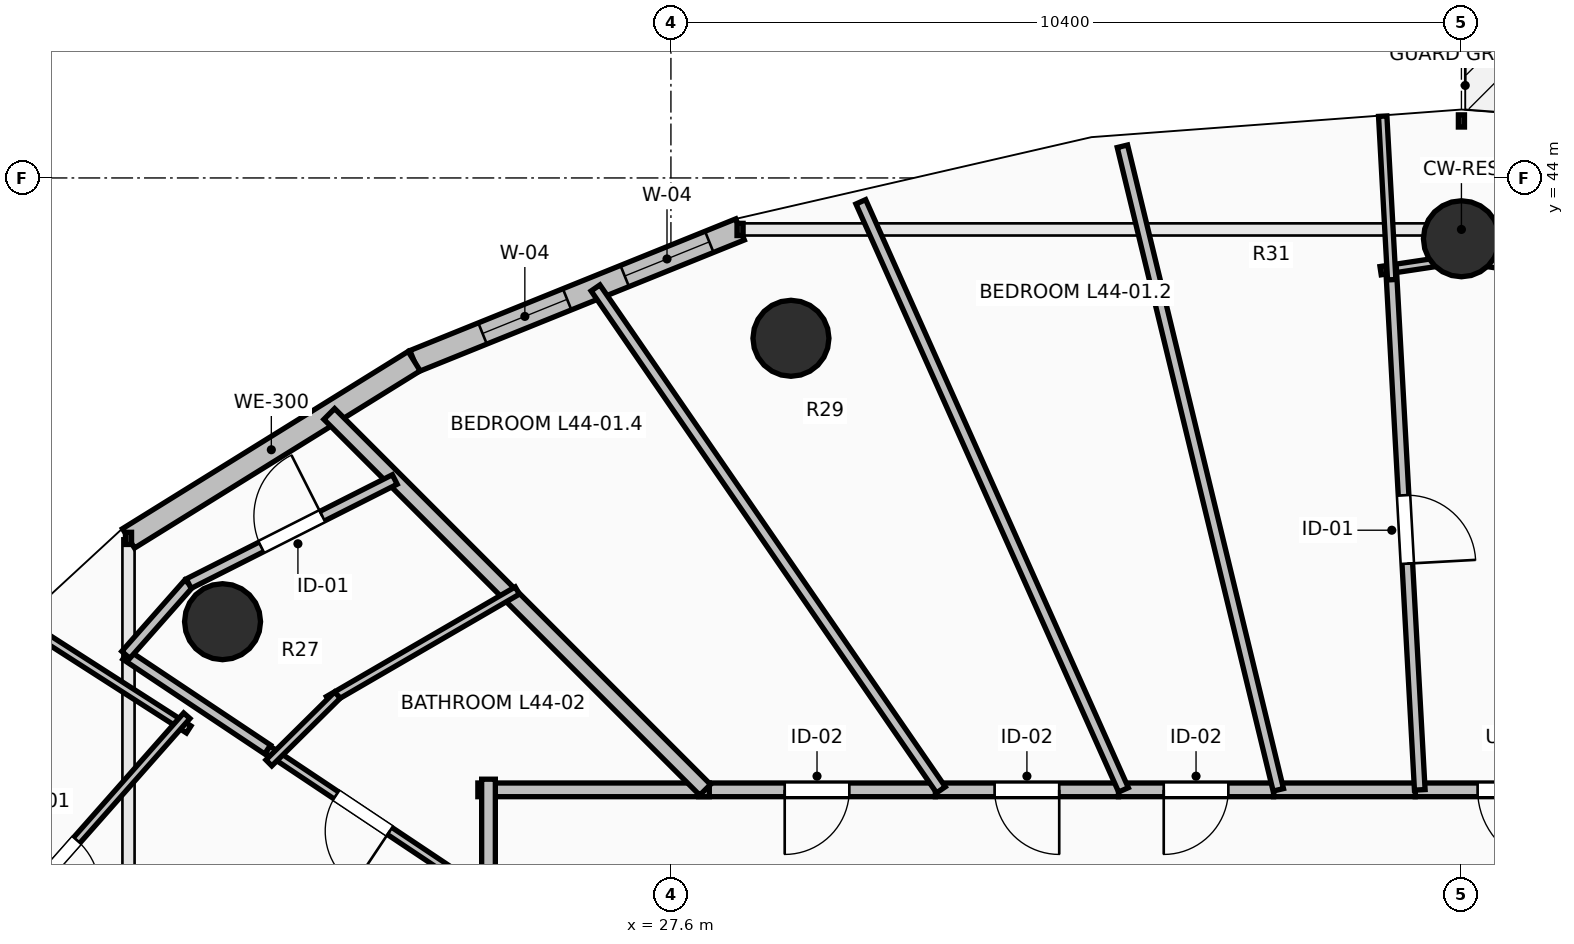
"""IFC4 building model, lengths in metres.
Left out: names, types, materials, properties, quantities, classifications, styles, units other than length and angle.
Written with IfcOpenShell. Run it as: python <this file> out.ifc"""

import sys

from ifc_helpers import new_model, si_unit, direction, frame, frame_2d, origin, origin_2d, place, context, subcontext, project, spatial, rectangle, circle, extrude, element, fill, save


model = new_model("IFC4")
c1 = context("Model", 3, precision=1e-05, world=origin(), true_north=direction((0.0, 1.0)))
c2 = subcontext(c1, "Body", "Model", "MODEL_VIEW")
j1 = project(units=[si_unit("LENGTHUNIT", "METRE"), si_unit("PLANEANGLEUNIT", "RADIAN")], contexts=[c1])
p1 = place(None, origin())
s1 = spatial("IfcSite", under=j1, at=p1, CompositionType="ELEMENT")
p2 = place(p1, origin())
s2 = spatial("IfcBuilding", under=s1, at=p2, CompositionType="ELEMENT")
p3 = place(p2, frame((0.0, 0.0, 164.1)))
s3 = spatial("IfcBuildingStorey", under=s2, at=p3, CompositionType="ELEMENT", Elevation=164.1)
for number, where, z_axis, x_axis in (
    (1, (38.0, 43.2, 0.0), (0.0, 0.0, 1.0), (0.0, 1.0, 0.0)),
    (2, (29.179, 41.891, 0.0), (0.0, 0.0, 1.0), (-0.383, 0.924, 0.0)),
    (3, (21.701, 38.162, 0.0), (0.0, 0.0, 1.0), (-0.707, 0.707, 0.0)),
):
    element("IfcColumn", number, at=place(p3, frame(where, z_axis=z_axis, x_axis=x_axis)), inside=s3, PredefinedType="COLUMN", context=c2, shape_type="SweptSolid", body=[
        extrude(circle(Radius=0.5, at=origin_2d()), origin(), (0.0, 0.0, 1.0), 3.5),
    ])
p4 = place(p3, frame((28.51, 43.323, 0.0), z_axis=(0.0, 0.0, 1.0), x_axis=(-0.927156504392, -0.374674280359, 0.0)))
e4 = element("IfcWall", 4, at=p4, inside=s3, PredefinedType="STANDARD", context=c2, shape_type="SweptSolid", body=[
    extrude(rectangle(XDim=4.625, YDim=0.3, at=frame_2d((2.312, 0.0))), origin(), (0.0, 0.0, 1.0), 3.24),
])
p5 = place(p4, frame((0.437, 0.0, 0.85)))
e5 = element("IfcOpeningElement", 5, at=p5, cuts=e4, PredefinedType="OPENING", context=c2, shape_type="SweptSolid", body=[
    extrude(rectangle(XDim=1.2, YDim=1.95, at=frame_2d((0.6, 0.975))), frame((0.0, 0.165, 0.0), z_axis=(0.0, -1.0, 0.0), x_axis=(1.0, 0.0, 0.0)), (0.0, 0.0, 1.0), 0.33),
])
p6 = place(p4, frame((2.454, 0.0, 0.85)))
e6 = element("IfcOpeningElement", 6, at=p6, cuts=e4, PredefinedType="OPENING", context=c2, shape_type="SweptSolid", body=[
    extrude(rectangle(XDim=1.2, YDim=1.95, at=frame_2d((0.6, 0.975))), frame((0.0, 0.165, 0.0), z_axis=(0.0, -1.0, 0.0), x_axis=(1.0, 0.0, 0.0)), (0.0, 0.0, 1.0), 0.33),
])
p7 = place(p3, frame((24.222, 41.59, 0.0), z_axis=(0.0, 0.0, 1.0), x_axis=(-0.849721181976, -0.527232313977, 0.0)))
e7 = element("IfcWall", 7, at=p7, inside=s3, PredefinedType="STANDARD", context=c2, shape_type="SweptSolid", body=[
    extrude(rectangle(XDim=4.423, YDim=0.3, at=frame_2d((2.211, 0.0))), origin(), (0.0, 0.0, 1.0), 3.24),
])
p8 = place(p3, frame((40.034, 35.95, 0.0), z_axis=(0.0, 0.0, 1.0), x_axis=(-1.0, 0.0, 0.0)))
e8 = element("IfcWall", 8, at=p8, inside=s3, PredefinedType="PARTITIONING", context=c2, shape_type="SweptSolid", body=[
    extrude(rectangle(XDim=2.642, YDim=0.18, at=frame_2d((1.321, 0.0))), origin(), (0.0, 0.0, 1.0), 3.24),
])
p9 = place(p8, frame((0.821, 0.0, 0.0)))
e9 = element("IfcOpeningElement", 9, at=p9, cuts=e8, PredefinedType="OPENING", context=c2, shape_type="SweptSolid", body=[
    extrude(rectangle(XDim=1.0, YDim=2.15, at=frame_2d((0.5, 1.075))), frame((0.0, 0.105, 0.0), z_axis=(0.0, -1.0, 0.0), x_axis=(1.0, 0.0, 0.0)), (0.0, 0.0, 1.0), 0.21),
])
p10 = place(p3, frame((37.392, 35.95, 0.0), z_axis=(0.0, 0.0, 1.0), x_axis=(-1.0, 0.0, 0.0)))
e10 = element("IfcWall", 10, at=p10, inside=s3, PredefinedType="PARTITIONING", context=c2, shape_type="SweptSolid", body=[
    extrude(rectangle(XDim=1.863, YDim=0.18, at=frame_2d((0.932, 0.0))), origin(), (0.0, 0.0, 1.0), 3.24),
])
p11 = place(p3, frame((35.529, 35.95, 0.0), z_axis=(0.0, 0.0, 1.0), x_axis=(-1.0, 0.0, 0.0)))
e11 = element("IfcWall", 11, at=p11, inside=s3, PredefinedType="PARTITIONING", context=c2, shape_type="SweptSolid", body=[
    extrude(rectangle(XDim=2.041, YDim=0.18, at=frame_2d((1.021, 0.0))), origin(), (0.0, 0.0, 1.0), 3.24),
])
p12 = place(p11, frame((0.595, 0.0, 0.0)))
e12 = element("IfcOpeningElement", 12, at=p12, cuts=e11, PredefinedType="OPENING", context=c2, shape_type="SweptSolid", body=[
    extrude(rectangle(XDim=0.85, YDim=2.1, at=frame_2d((0.425, 1.05))), frame((0.0, 0.105, 0.0), z_axis=(0.0, -1.0, 0.0), x_axis=(1.0, 0.0, 0.0)), (0.0, 0.0, 1.0), 0.21),
])
p13 = place(p3, frame((33.488, 35.95, 0.0), z_axis=(0.0, 0.0, 1.0), x_axis=(-1.0, 0.0, 0.0)))
e13 = element("IfcWall", 13, at=p13, inside=s3, PredefinedType="PARTITIONING", context=c2, shape_type="SweptSolid", body=[
    extrude(rectangle(XDim=2.409, YDim=0.18, at=frame_2d((1.205, 0.0))), origin(), (0.0, 0.0, 1.0), 3.24),
])
p14 = place(p13, frame((0.78, 0.0, 0.0)))
e14 = element("IfcOpeningElement", 14, at=p14, cuts=e13, PredefinedType="OPENING", context=c2, shape_type="SweptSolid", body=[
    extrude(rectangle(XDim=0.85, YDim=2.1, at=frame_2d((0.425, 1.05))), frame((0.0, 0.105, 0.0), z_axis=(0.0, -1.0, 0.0), x_axis=(1.0, 0.0, 0.0)), (0.0, 0.0, 1.0), 0.21),
])
p15 = place(p3, frame((31.079, 35.95, 0.0), z_axis=(0.0, 0.0, 1.0), x_axis=(-1.0, 0.0, 0.0)))
e15 = element("IfcWall", 15, at=p15, inside=s3, PredefinedType="PARTITIONING", context=c2, shape_type="SweptSolid", body=[
    extrude(rectangle(XDim=3.114, YDim=0.18, at=frame_2d((1.557, 0.0))), origin(), (0.0, 0.0, 1.0), 2.432),
])
p16 = place(p15, frame((1.132, 0.0, 0.0)))
e16 = element("IfcOpeningElement", 16, at=p16, cuts=e15, PredefinedType="OPENING", context=c2, shape_type="SweptSolid", body=[
    extrude(rectangle(XDim=0.85, YDim=2.1, at=frame_2d((0.425, 1.05))), frame((0.0, 0.105, 0.0), z_axis=(0.0, -1.0, 0.0), x_axis=(1.0, 0.0, 0.0)), (0.0, 0.0, 1.0), 0.21),
])
p17 = place(p3, frame((28.105, 35.95, 0.0), z_axis=(0.0, 0.0, 1.0), x_axis=(-1.0, 0.0, 0.0)))
e17 = element("IfcWall", 17, at=p17, inside=s3, PredefinedType="PARTITIONING", context=c2, shape_type="SweptSolid", body=[
    extrude(rectangle(XDim=3.045, YDim=0.18, at=frame_2d((1.522, 0.0))), origin(), (0.0, 0.0, 1.0), 2.432),
])
p18 = place(p3, frame((25.2, 36.09, 0.0), z_axis=(0.0, 0.0, 1.0), x_axis=(0.0, -1.0, 0.0)))
e18 = element("IfcWall", 18, at=p18, inside=s3, PredefinedType="PARTITIONING", context=c2, shape_type="SweptSolid", body=[
    extrude(rectangle(XDim=1.617, YDim=0.18, at=frame_2d((0.809, 0.0))), origin(), (0.0, 0.0, 1.0), 2.432),
])
p19 = place(p3, frame((41.102, 42.473, 0.0), z_axis=(0.0, 0.0, 1.0), x_axis=(-0.98887178047, 0.148770298749, 0.0)))
e19 = element("IfcWall", 19, at=p19, inside=s3, PredefinedType="PARTITIONING", context=c2, shape_type="SweptSolid", body=[
    extrude(rectangle(XDim=3.277, YDim=0.11, at=frame_2d((1.639, 0.0))), origin(), (0.0, 0.0, 1.0), 2.432),
])
p20 = place(p19, frame((1.189, 0.0, 0.0)))
e20 = element("IfcOpeningElement", 20, at=p20, cuts=e19, PredefinedType="OPENING", context=c2, shape_type="SweptSolid", body=[
    extrude(rectangle(XDim=0.9, YDim=2.1, at=frame_2d((0.45, 1.05))), frame((0.0, 0.07, 0.0), z_axis=(0.0, -1.0, 0.0), x_axis=(1.0, 0.0, 0.0)), (0.0, 0.0, 1.0), 0.14),
])
p21 = place(p3, frame((38.138, 42.961, 0.0), z_axis=(0.0, 0.0, 1.0), x_axis=(-0.988920139242, -0.148448503534, 0.0)))
e21 = element("IfcWall", 21, at=p21, inside=s3, PredefinedType="PARTITIONING", context=c2, shape_type="SweptSolid", body=[
    extrude(rectangle(XDim=1.215, YDim=0.11, at=frame_2d((0.608, 0.0))), origin(), (0.0, 0.0, 1.0), 2.432),
])
p22 = place(p3, frame((37.075, 42.801, 0.0), z_axis=(0.0, 0.0, 1.0), x_axis=(0.054937930554, -0.998489771498, 0.0)))
e22 = element("IfcWall", 22, at=p22, inside=s3, PredefinedType="PARTITIONING", context=c2, shape_type="SweptSolid", body=[
    extrude(rectangle(XDim=6.861, YDim=0.14, at=frame_2d((3.431, 0.0))), origin(), (0.0, 0.0, 1.0), 2.432),
])
p23 = place(p22, frame((2.981, 0.0, 0.0)))
e23 = element("IfcOpeningElement", 23, at=p23, cuts=e22, PredefinedType="OPENING", context=c2, shape_type="SweptSolid", body=[
    extrude(rectangle(XDim=0.9, YDim=2.1, at=frame_2d((0.45, 1.05))), frame((0.0, 0.085, 0.0), z_axis=(0.0, -1.0, 0.0), x_axis=(1.0, 0.0, 0.0)), (0.0, 0.0, 1.0), 0.17),
])
p24 = place(p3, frame((36.964, 44.813, 0.0), z_axis=(0.0, 0.0, 1.0), x_axis=(0.054949193079, -0.998489151759, 0.0)))
e24 = element("IfcWall", 24, at=p24, inside=s3, PredefinedType="PARTITIONING", context=c2, shape_type="SweptSolid", body=[
    extrude(rectangle(XDim=2.155, YDim=0.11, at=frame_2d((1.077, 0.0))), origin(), (0.0, 0.0, 1.0), 2.432),
])
p25 = place(p3, frame((33.54, 44.417, 0.0), z_axis=(0.0, 0.0, 1.0), x_axis=(0.235427577375, -0.971891895126, 0.0)))
e25 = element("IfcWall", 25, at=p25, inside=s3, PredefinedType="PARTITIONING", context=c2, shape_type="SweptSolid", body=[
    extrude(rectangle(XDim=8.712, YDim=0.14, at=frame_2d((4.356, 0.0))), origin(), (0.0, 0.0, 1.0), 2.432),
])
p26 = place(p3, frame((30.098, 43.686, 0.0), z_axis=(0.0, 0.0, 1.0), x_axis=(0.407891512679, -0.913030401402, 0.0)))
e26 = element("IfcWall", 26, at=p26, inside=s3, PredefinedType="PARTITIONING", context=c2, shape_type="SweptSolid", body=[
    extrude(rectangle(XDim=8.473, YDim=0.14, at=frame_2d((4.236, 0.0))), origin(), (0.0, 0.0, 1.0), 2.432),
])
p27 = place(p3, frame((26.608, 42.553, 0.0), z_axis=(0.0, 0.0, 1.0), x_axis=(0.566919141794, -0.823773443774, 0.0)))
e27 = element("IfcWall", 27, at=p27, inside=s3, PredefinedType="PARTITIONING", context=c2, shape_type="SweptSolid", body=[
    extrude(rectangle(XDim=8.016, YDim=0.14, at=frame_2d((4.008, 0.0))), origin(), (0.0, 0.0, 1.0), 2.432),
])
p28 = place(p3, frame((23.105, 40.895, 0.0), z_axis=(0.0, 0.0, 1.0), x_axis=(0.707106781187, -0.707106781187, 0.0)))
e28 = element("IfcWall", 28, at=p28, inside=s3, PredefinedType="PARTITIONING", context=c2, shape_type="SweptSolid", body=[
    extrude(rectangle(XDim=6.993, YDim=0.2, at=frame_2d((3.497, 0.0))), origin(), (0.0, 0.0, 1.0), 2.432),
])
p29 = place(p3, frame((24.79, 34.815, 0.0), z_axis=(0.0, 0.0, 1.0), x_axis=(-0.831749793219, 0.555150683581, 0.0)))
e29 = element("IfcWall", 29, at=p29, inside=s3, PredefinedType="PARTITIONING", context=c2, shape_type="SweptSolid", body=[
    extrude(rectangle(XDim=3.001, YDim=0.11, at=frame_2d((1.5, 0.0))), origin(), (0.0, 0.0, 1.0), 2.886),
])
p30 = place(p29, frame((1.068, 0.0, 0.0)))
e30 = element("IfcOpeningElement", 30, at=p30, cuts=e29, PredefinedType="OPENING", context=c2, shape_type="SweptSolid", body=[
    extrude(rectangle(XDim=0.85, YDim=2.1, at=frame_2d((0.425, 1.05))), frame((0.0, 0.07, 0.0), z_axis=(0.0, -1.0, 0.0), x_axis=(1.0, 0.0, 0.0)), (0.0, 0.0, 1.0), 0.14),
])
p31 = place(p3, frame((19.064, 38.151, 0.0), z_axis=(0.0, 0.0, 1.0), x_axis=(0.841644233319, -0.540032392104, 0.0)))
e31 = element("IfcWall", 31, at=p31, inside=s3, PredefinedType="PARTITIONING", context=c2, shape_type="SweptSolid", body=[
    extrude(rectangle(XDim=2.604, YDim=0.11, at=frame_2d((1.302, 0.0))), origin(), (0.0, 0.0, 1.0), 2.728),
])
p32 = place(p3, frame((21.231, 36.925, 0.0), z_axis=(0.0, 0.0, 1.0), x_axis=(-0.662281895209, -0.749254757261, 0.0)))
e32 = element("IfcWall", 32, at=p32, inside=s3, PredefinedType="PARTITIONING", context=c2, shape_type="SweptSolid", body=[
    extrude(rectangle(XDim=5.269, YDim=0.11, at=frame_2d((2.634, 0.0))), origin(), (0.0, 0.0, 1.0), 3.24),
])
p33 = place(p32, frame((2.184, 0.0, 0.0)))
e33 = element("IfcOpeningElement", 33, at=p33, cuts=e32, PredefinedType="OPENING", context=c2, shape_type="SweptSolid", body=[
    extrude(rectangle(XDim=0.9, YDim=2.1, at=frame_2d((0.45, 1.05))), frame((0.0, 0.07, 0.0), z_axis=(0.0, -1.0, 0.0), x_axis=(1.0, 0.0, 0.0)), (0.0, 0.0, 1.0), 0.14),
])
p34 = place(p3, frame((22.294, 36.481, 0.0), z_axis=(0.0, 0.0, 1.0), x_axis=(-0.831732018696, 0.555177313186, 0.0)))
e34 = element("IfcWall", 34, at=p34, inside=s3, PredefinedType="PARTITIONING", context=c2, shape_type="SweptSolid", body=[
    extrude(rectangle(XDim=2.243, YDim=0.14, at=frame_2d((1.122, 0.0))), origin(), (0.0, 0.0, 1.0), 2.728),
])
p35 = place(p3, frame((20.428, 37.726, 0.0), z_axis=(0.0, 0.0, 1.0), x_axis=(0.662228388064, 0.749302049938, 0.0)))
e35 = element("IfcWall", 35, at=p35, inside=s3, PredefinedType="PARTITIONING", context=c2, shape_type="SweptSolid", body=[
    extrude(rectangle(XDim=1.25, YDim=0.14, at=frame_2d((0.625, 0.0))), origin(), (0.0, 0.0, 1.0), 3.24),
])
p36 = place(p3, frame((21.256, 38.663, 0.0), z_axis=(0.0, 0.0, 1.0), x_axis=(0.892522213595, 0.451003434842, 0.0)))
e36 = element("IfcWall", 36, at=p36, inside=s3, PredefinedType="PARTITIONING", context=c2, shape_type="SweptSolid", body=[
    extrude(rectangle(XDim=3.037, YDim=0.14, at=frame_2d((1.519, 0.0))), origin(), (0.0, 0.0, 1.0), 3.24),
])
p37 = place(p36, frame((1.069, 0.0, 0.0)))
e37 = element("IfcOpeningElement", 37, at=p37, cuts=e36, PredefinedType="OPENING", context=c2, shape_type="SweptSolid", body=[
    extrude(rectangle(XDim=0.9, YDim=2.1, at=frame_2d((0.45, 1.05))), frame((0.0, 0.085, 0.0), z_axis=(0.0, -1.0, 0.0), x_axis=(1.0, 0.0, 0.0)), (0.0, 0.0, 1.0), 0.17),
])
p38 = place(p3, frame((25.579, 38.572, 0.0), z_axis=(0.0, 0.0, 1.0), x_axis=(-0.864754420197, -0.502194974835, 0.0)))
e38 = element("IfcWall", 38, at=p38, inside=s3, PredefinedType="PARTITIONING", context=c2, shape_type="SweptSolid", body=[
    extrude(rectangle(XDim=2.873, YDim=0.11, at=frame_2d((1.436, 0.0))), origin(), (0.0, 0.0, 1.0), 2.432),
])
p39 = place(p3, frame((23.213, 37.197, 0.0), z_axis=(0.0, 0.0, 1.0), x_axis=(-0.711040657556, -0.703150896538, 0.0)))
e39 = element("IfcWall", 39, at=p39, inside=s3, PredefinedType="PARTITIONING", context=c2, shape_type="SweptSolid", body=[
    extrude(rectangle(XDim=1.269, YDim=0.11, at=frame_2d((0.634, 0.0))), origin(), (0.0, 0.0, 1.0), 2.432),
])
p40 = place(p5, origin())
e40 = element("IfcWindow", 40, at=p40, inside=s3, PartitioningType="SINGLE_PANEL", PredefinedType="WINDOW", context=c2, shape_type="SweptSolid", body=[
    extrude(rectangle(XDim=1.2, YDim=1.95, at=frame_2d((0.6, 0.975))), frame((0.0, 0.03, 0.0), z_axis=(0.0, -1.0, 0.0), x_axis=(1.0, 0.0, 0.0)), (0.0, 0.0, 1.0), 0.06),
])
fill(e5, e40)
p41 = place(p6, origin())
e41 = element("IfcWindow", 41, at=p41, inside=s3, PartitioningType="SINGLE_PANEL", PredefinedType="WINDOW", context=c2, shape_type="SweptSolid", body=[
    extrude(rectangle(XDim=1.2, YDim=1.95, at=frame_2d((0.6, 0.975))), frame((0.0, 0.03, 0.0), z_axis=(0.0, -1.0, 0.0), x_axis=(1.0, 0.0, 0.0)), (0.0, 0.0, 1.0), 0.06),
])
fill(e6, e41)
p42 = place(p9, origin())
e42 = element("IfcDoor", 42, at=p42, inside=s3, OperationType="SINGLE_SWING_LEFT", PredefinedType="DOOR", context=c2, shape_type="SweptSolid", body=[
    extrude(rectangle(XDim=1.0, YDim=2.15, at=frame_2d((0.5, 1.075))), frame((0.0, 0.025, 0.0), z_axis=(0.0, -1.0, 0.0), x_axis=(1.0, 0.0, 0.0)), (0.0, 0.0, 1.0), 0.05),
])
fill(e9, e42)
p43 = place(p23, origin())
e43 = element("IfcDoor", 43, at=p43, inside=s3, OperationType="SINGLE_SWING_RIGHT", PredefinedType="DOOR", context=c2, shape_type="SweptSolid", body=[
    extrude(rectangle(XDim=0.9, YDim=2.1, at=frame_2d((0.45, 1.05))), frame((0.0, 0.025, 0.0), z_axis=(0.0, -1.0, 0.0), x_axis=(1.0, 0.0, 0.0)), (0.0, 0.0, 1.0), 0.05),
])
fill(e23, e43)
p44 = place(p30, origin())
e44 = element("IfcDoor", 44, at=p44, inside=s3, OperationType="SINGLE_SWING_LEFT", PredefinedType="DOOR", context=c2, shape_type="SweptSolid", body=[
    extrude(rectangle(XDim=0.85, YDim=2.1, at=frame_2d((0.425, 1.05))), frame((0.0, 0.025, 0.0), z_axis=(0.0, -1.0, 0.0), x_axis=(1.0, 0.0, 0.0)), (0.0, 0.0, 1.0), 0.05),
])
fill(e30, e44)
p45 = place(p33, origin())
e45 = element("IfcDoor", 45, at=p45, inside=s3, OperationType="SINGLE_SWING_RIGHT", PredefinedType="DOOR", context=c2, shape_type="SweptSolid", body=[
    extrude(rectangle(XDim=0.9, YDim=2.1, at=frame_2d((0.45, 1.05))), frame((0.0, 0.025, 0.0), z_axis=(0.0, -1.0, 0.0), x_axis=(1.0, 0.0, 0.0)), (0.0, 0.0, 1.0), 0.05),
])
fill(e33, e45)
p46 = place(p37, origin())
e46 = element("IfcDoor", 46, at=p46, inside=s3, OperationType="SINGLE_SWING_RIGHT", PredefinedType="DOOR", context=c2, shape_type="SweptSolid", body=[
    extrude(rectangle(XDim=0.9, YDim=2.1, at=frame_2d((0.45, 1.05))), frame((0.0, 0.025, 0.0), z_axis=(0.0, -1.0, 0.0), x_axis=(1.0, 0.0, 0.0)), (0.0, 0.0, 1.0), 0.05),
])
fill(e37, e46)
p47 = place(p12, origin())
e47 = element("IfcDoor", 47, at=p47, inside=s3, OperationType="SINGLE_SWING_RIGHT", PredefinedType="DOOR", context=c2, shape_type="SweptSolid", body=[
    extrude(rectangle(XDim=0.85, YDim=2.1, at=frame_2d((0.425, 1.05))), frame((0.0, 0.025, 0.0), z_axis=(0.0, -1.0, 0.0), x_axis=(1.0, 0.0, 0.0)), (0.0, 0.0, 1.0), 0.05),
])
fill(e12, e47)
p48 = place(p14, origin())
e48 = element("IfcDoor", 48, at=p48, inside=s3, OperationType="SINGLE_SWING_LEFT", PredefinedType="DOOR", context=c2, shape_type="SweptSolid", body=[
    extrude(rectangle(XDim=0.85, YDim=2.1, at=frame_2d((0.425, 1.05))), frame((0.0, 0.025, 0.0), z_axis=(0.0, -1.0, 0.0), x_axis=(1.0, 0.0, 0.0)), (0.0, 0.0, 1.0), 0.05),
])
fill(e14, e48)
p49 = place(p16, origin())
e49 = element("IfcDoor", 49, at=p49, inside=s3, OperationType="SINGLE_SWING_RIGHT", PredefinedType="DOOR", context=c2, shape_type="SweptSolid", body=[
    extrude(rectangle(XDim=0.85, YDim=2.1, at=frame_2d((0.425, 1.05))), frame((0.0, 0.025, 0.0), z_axis=(0.0, -1.0, 0.0), x_axis=(1.0, 0.0, 0.0)), (0.0, 0.0, 1.0), 0.05),
])
fill(e16, e49)
save(model, sys.argv[1])
